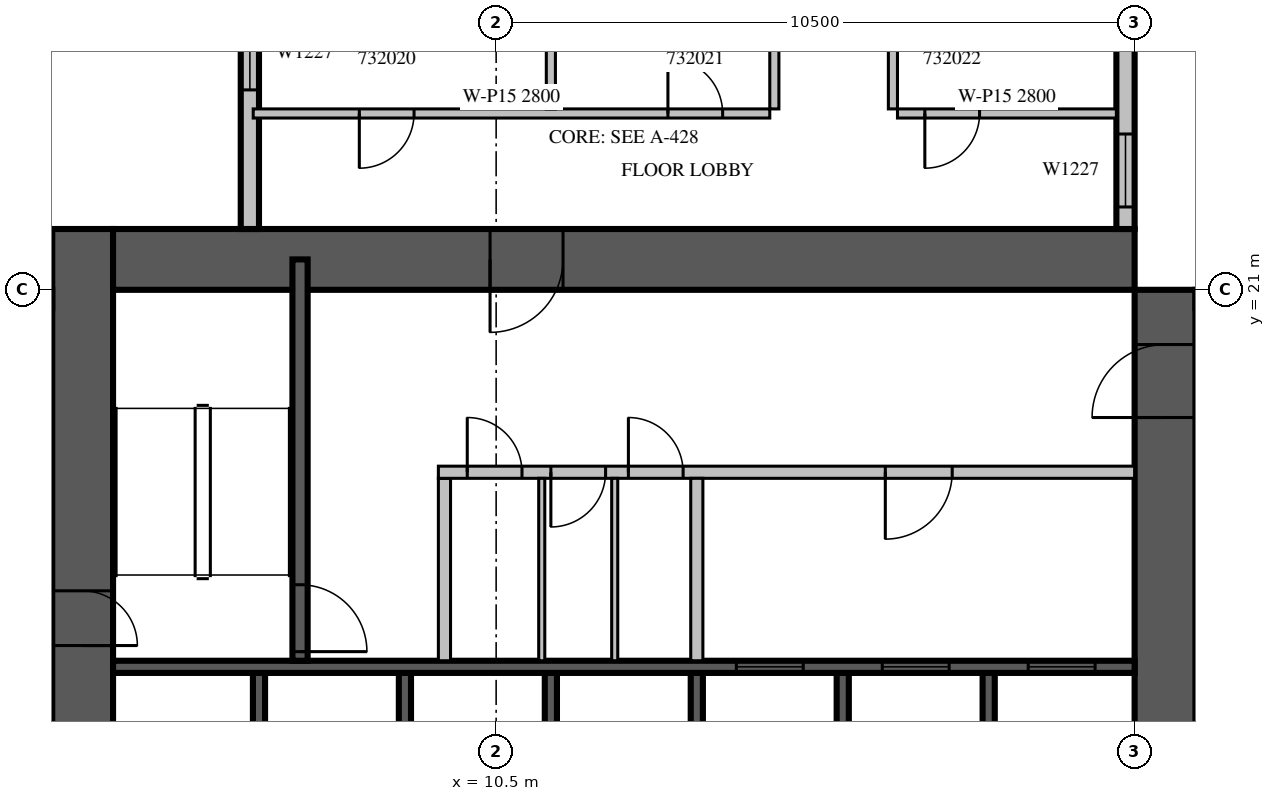
"""IFC4 building model, lengths in metres.
Left out: names, types, materials, properties, quantities, classifications, styles, units other than length and angle.
Written with IfcOpenShell. Run it as: python <this file> out.ifc"""

import sys

from ifc_helpers import new_model, si_unit, direction, frame, frame_2d, origin, place, context, subcontext, project, spatial, rectangle, extrude, source, transform, mapped, element, fill, save


model = new_model("IFC4")
c1 = context("Model", 3, precision=1e-05, world=origin(), true_north=direction((0.0, 1.0)))
c2 = subcontext(c1, "Body", "Model", "MODEL_VIEW")
j1 = project(units=[si_unit("LENGTHUNIT", "METRE"), si_unit("PLANEANGLEUNIT", "RADIAN")], contexts=[c1])
p1 = place(None, origin())
s1 = spatial("IfcSite", under=j1, at=p1, CompositionType="ELEMENT")
p2 = place(p1, origin())
s2 = spatial("IfcBuilding", under=s1, at=p2, CompositionType="ELEMENT")
p3 = place(p2, frame((0.0, 0.0, 145.5)))
s3 = spatial("IfcBuildingStorey", under=s2, at=p3, CompositionType="ELEMENT", Elevation=145.5)
m1 = source(origin(), c2, "Body", "SweptSolid", [
    extrude(rectangle(XDim=17.8, YDim=1.0, at=frame_2d((8.9, 0.0))), origin(), (0.0, 0.0, 1.0), 4.2),
])
p4 = place(p3, frame((3.7, 4.2, 0.0), z_axis=(0.0, 0.0, 1.0), x_axis=(0.0, 1.0, 0.0)))
e1 = element("IfcWall", 1, at=p4, inside=s3, PredefinedType="SHEAR", context=c2, shape_type="MappedRepresentation", body=[
    mapped(m1, transform((0.0, 0.0, 0.0), scale=1.0)),
])
m2 = source(origin(), c2, "Body", "SweptSolid", [
    extrude(rectangle(XDim=2.2, YDim=2.1, at=frame_2d((1.1, 1.05))), frame((0.0, 0.51, 0.0), z_axis=(0.0, -1.0, 0.0), x_axis=(1.0, 0.0, 0.0)), (0.0, 0.0, 1.0), 1.02),
])
p5 = place(p4, frame((4.2, 0.0, 0.0)))
e2 = element("IfcOpeningElement", 2, at=p5, cuts=e1, PredefinedType="OPENING", context=c2, shape_type="MappedRepresentation", body=[
    mapped(m2, transform((0.0, 0.0, 0.0), scale=1.0)),
])
m3 = source(origin(), c2, "Body", "SweptSolid", [
    extrude(rectangle(XDim=0.9, YDim=2.1, at=frame_2d((0.45, 1.05))), frame((0.0, 0.51, 0.0), z_axis=(0.0, -1.0, 0.0), x_axis=(1.0, 0.0, 0.0)), (0.0, 0.0, 1.0), 1.02),
])
p6 = place(p4, frame((10.95, 0.0, 0.0)))
e3 = element("IfcOpeningElement", 3, at=p6, cuts=e1, PredefinedType="OPENING", context=c2, shape_type="MappedRepresentation", body=[
    mapped(m3, transform((0.0, 0.0, 0.0), scale=1.0)),
])
m4 = source(origin(), c2, "Body", "SweptSolid", [
    extrude(rectangle(XDim=16.8, YDim=1.0, at=frame_2d((8.4, 0.0))), origin(), (0.0, 0.0, 1.0), 4.2),
])
p7 = place(p3, frame((21.5, 4.2, 0.0), z_axis=(0.0, 0.0, 1.0), x_axis=(0.0, 1.0, 0.0)))
e4 = element("IfcWall", 4, at=p7, inside=s3, PredefinedType="SHEAR", context=c2, shape_type="MappedRepresentation", body=[
    mapped(m4, transform((0.0, 0.0, 0.0), scale=1.0)),
])
p8 = place(p7, frame((4.2, 0.0, 0.0)))
e5 = element("IfcOpeningElement", 5, at=p8, cuts=e4, PredefinedType="OPENING", context=c2, shape_type="MappedRepresentation", body=[
    mapped(m2, transform((0.0, 0.0, 0.0), scale=1.0)),
])
m5 = source(origin(), c2, "Body", "SweptSolid", [
    extrude(rectangle(XDim=1.2, YDim=2.1, at=frame_2d((0.6, 1.05))), frame((0.0, 0.51, 0.0), z_axis=(0.0, -1.0, 0.0), x_axis=(1.0, 0.0, 0.0)), (0.0, 0.0, 1.0), 1.02),
])
p9 = place(p7, frame((14.7, 0.0, 0.0)))
e6 = element("IfcOpeningElement", 6, at=p9, cuts=e4, PredefinedType="OPENING", context=c2, shape_type="MappedRepresentation", body=[
    mapped(m5, transform((0.0, 0.0, 0.0), scale=1.0)),
])
p10 = place(p3, frame((4.2, 21.5, 0.0), z_axis=(0.0, 0.0, 1.0), x_axis=(1.0, 0.0, 0.0)))
e7 = element("IfcWall", 7, at=p10, inside=s3, PredefinedType="SHEAR", context=c2, shape_type="MappedRepresentation", body=[
    mapped(m4, transform((0.0, 0.0, 0.0), scale=1.0)),
])
p11 = place(p10, frame((6.2, 0.0, 0.0)))
e8 = element("IfcOpeningElement", 8, at=p11, cuts=e7, PredefinedType="OPENING", context=c2, shape_type="MappedRepresentation", body=[
    mapped(m5, transform((0.0, 0.0, 0.0), scale=1.0)),
])
m6 = source(origin(), c2, "Body", "SweptSolid", [
    extrude(rectangle(XDim=6.875, YDim=0.3, at=frame_2d((3.438, 0.0))), origin(), (0.0, 0.0, 1.0), 3.3),
])
p12 = place(p3, frame((20.85, 22.0, 0.0), z_axis=(0.0, 0.0, 1.0), x_axis=(0.0, 1.0, 0.0)))
e9 = element("IfcWall", 9, at=p12, inside=s3, PredefinedType="STANDARD", context=c2, shape_type="MappedRepresentation", body=[
    mapped(m6, transform((0.0, 0.0, 0.0), scale=1.0)),
])
m7 = source(origin(), c2, "Body", "SweptSolid", [
    extrude(rectangle(XDim=1.2, YDim=2.7, at=frame_2d((0.6, 1.35))), frame((0.0, 0.16, 0.0), z_axis=(0.0, -1.0, 0.0), x_axis=(1.0, 0.0, 0.0)), (0.0, 0.0, 1.0), 0.32),
])
p13 = place(p12, frame((0.362, 0.0, 0.6)))
e10 = element("IfcOpeningElement", 10, at=p13, cuts=e9, PredefinedType="OPENING", context=c2, shape_type="MappedRepresentation", body=[
    mapped(m7, transform((0.0, 0.0, 0.0), scale=1.0)),
])
m8 = source(origin(), c2, "Body", "SweptSolid", [
    extrude(rectangle(XDim=2.4, YDim=2.7, at=frame_2d((1.2, 1.35))), frame((0.0, 0.16, 0.0), z_axis=(0.0, -1.0, 0.0), x_axis=(1.0, 0.0, 0.0)), (0.0, 0.0, 1.0), 0.32),
])
p14 = place(p12, frame((4.1, 0.0, 0.6)))
e11 = element("IfcOpeningElement", 11, at=p14, cuts=e9, PredefinedType="OPENING", context=c2, shape_type="MappedRepresentation", body=[
    mapped(m8, transform((0.0, 0.0, 0.0), scale=1.0)),
])
m9 = source(origin(), c2, "Body", "SweptSolid", [
    extrude(rectangle(XDim=16.4, YDim=0.3, at=frame_2d((8.2, 0.0))), origin(), (0.0, 0.0, 1.0), 3.3),
])
p15 = place(p3, frame((6.45, 38.4, 0.0), z_axis=(0.0, 0.0, 1.0), x_axis=(0.0, -1.0, 0.0)))
e12 = element("IfcWall", 12, at=p15, inside=s3, PredefinedType="STANDARD", context=c2, shape_type="MappedRepresentation", body=[
    mapped(m9, transform((0.0, 0.0, 0.0), scale=1.0)),
])
m10 = source(origin(), c2, "Body", "SweptSolid", [
    extrude(rectangle(XDim=1.8, YDim=2.7, at=frame_2d((0.9, 1.35))), frame((0.0, 0.16, 0.0), z_axis=(0.0, -1.0, 0.0), x_axis=(1.0, 0.0, 0.0)), (0.0, 0.0, 1.0), 0.32),
])
p16 = place(p15, frame((1.15, 0.0, 0.6)))
e13 = element("IfcOpeningElement", 13, at=p16, cuts=e12, PredefinedType="OPENING", context=c2, shape_type="MappedRepresentation", body=[
    mapped(m10, transform((0.0, 0.0, 0.0), scale=1.0)),
])
p17 = place(p15, frame((5.162, 0.0, 0.6)))
e14 = element("IfcOpeningElement", 14, at=p17, cuts=e12, PredefinedType="OPENING", context=c2, shape_type="MappedRepresentation", body=[
    mapped(m10, transform((0.0, 0.0, 0.0), scale=1.0)),
])
p18 = place(p15, frame((9.438, 0.0, 0.6)))
e15 = element("IfcOpeningElement", 15, at=p18, cuts=e12, PredefinedType="OPENING", context=c2, shape_type="MappedRepresentation", body=[
    mapped(m10, transform((0.0, 0.0, 0.0), scale=1.0)),
])
p19 = place(p15, frame((12.912, 0.0, 0.6)))
e16 = element("IfcOpeningElement", 16, at=p19, cuts=e12, PredefinedType="OPENING", context=c2, shape_type="MappedRepresentation", body=[
    mapped(m7, transform((0.0, 0.0, 0.0), scale=1.0)),
])
m11 = source(origin(), c2, "Body", "SweptSolid", [
    extrude(rectangle(XDim=3.0, YDim=0.2, at=frame_2d((1.5, 0.0))), origin(), (0.0, 0.0, 1.0), 4.2),
])
for number, where, z_axis, x_axis in (
    (17, (6.6, 11.7, 0.0), (0.0, 0.0, 1.0), (0.0, 1.0, 0.0)),
    (18, (9.0, 11.7, 0.0), (0.0, 0.0, 1.0), (0.0, 1.0, 0.0)),
    (19, (11.4, 11.7, 0.0), (0.0, 0.0, 1.0), (0.0, 1.0, 0.0)),
    (20, (13.8, 11.7, 0.0), (0.0, 0.0, 1.0), (0.0, 1.0, 0.0)),
    (21, (16.2, 11.7, 0.0), (0.0, 0.0, 1.0), (0.0, 1.0, 0.0)),
    (22, (18.6, 11.7, 0.0), (0.0, 0.0, 1.0), (0.0, 1.0, 0.0)),
):
    element("IfcWall", number, at=place(p3, frame(where, z_axis=z_axis, x_axis=x_axis)), inside=s3, PredefinedType="SOLIDWALL", context=c2, shape_type="MappedRepresentation", body=[
        mapped(m11, transform((0.0, 0.0, 0.0), scale=1.0)),
    ])
m12 = source(origin(), c2, "Body", "SweptSolid", [
    extrude(rectangle(XDim=16.8, YDim=0.2, at=frame_2d((8.4, 0.0))), origin(), (0.0, 0.0, 1.0), 4.2),
])
p20 = place(p3, frame((4.2, 14.8, 0.0), z_axis=(0.0, 0.0, 1.0), x_axis=(1.0, 0.0, 0.0)))
e23 = element("IfcWall", 23, at=p20, inside=s3, PredefinedType="SOLIDWALL", context=c2, shape_type="MappedRepresentation", body=[
    mapped(m12, transform((0.0, 0.0, 0.0), scale=1.0)),
])
m13 = source(origin(), c2, "Body", "SweptSolid", [
    extrude(rectangle(XDim=1.1, YDim=2.1, at=frame_2d((0.55, 1.05))), frame((0.0, 0.11, 0.0), z_axis=(0.0, -1.0, 0.0), x_axis=(1.0, 0.0, 0.0)), (0.0, 0.0, 1.0), 0.22),
])
p21 = place(p20, frame((10.25, 0.0, 0.0)))
e24 = element("IfcOpeningElement", 24, at=p21, cuts=e23, PredefinedType="OPENING", context=c2, shape_type="MappedRepresentation", body=[
    mapped(m13, transform((0.0, 0.0, 0.0), scale=1.0)),
])
p22 = place(p20, frame((12.65, 0.0, 0.0)))
e25 = element("IfcOpeningElement", 25, at=p22, cuts=e23, PredefinedType="OPENING", context=c2, shape_type="MappedRepresentation", body=[
    mapped(m13, transform((0.0, 0.0, 0.0), scale=1.0)),
])
p23 = place(p20, frame((15.05, 0.0, 0.0)))
e26 = element("IfcOpeningElement", 26, at=p23, cuts=e23, PredefinedType="OPENING", context=c2, shape_type="MappedRepresentation", body=[
    mapped(m13, transform((0.0, 0.0, 0.0), scale=1.0)),
])
m14 = source(origin(), c2, "Body", "SweptSolid", [
    extrude(rectangle(XDim=6.6, YDim=0.25, at=frame_2d((3.3, 0.0))), origin(), (0.0, 0.0, 1.0), 3.8),
])
p24 = place(p3, frame((7.275, 14.9, 0.0), z_axis=(0.0, 0.0, 1.0), x_axis=(0.0, 1.0, 0.0)))
e27 = element("IfcWall", 27, at=p24, inside=s3, PredefinedType="SOLIDWALL", context=c2, shape_type="MappedRepresentation", body=[
    mapped(m14, transform((0.0, 0.0, 0.0), scale=1.0)),
])
m15 = source(origin(), c2, "Body", "SweptSolid", [
    extrude(rectangle(XDim=1.1, YDim=2.1, at=frame_2d((0.55, 1.05))), frame((0.0, 0.135, 0.0), z_axis=(0.0, -1.0, 0.0), x_axis=(1.0, 0.0, 0.0)), (0.0, 0.0, 1.0), 0.27),
])
p25 = place(p24, frame((0.15, 0.0, 0.0)))
e28 = element("IfcOpeningElement", 28, at=p25, cuts=e27, PredefinedType="OPENING", context=c2, shape_type="MappedRepresentation", body=[
    mapped(m15, transform((0.0, 0.0, 0.0), scale=1.0)),
])
m16 = source(origin(), c2, "Body", "SweptSolid", [
    extrude(rectangle(XDim=3.0, YDim=0.2, at=frame_2d((1.5, 0.0))), origin(), (0.0, 0.0, 1.0), 3.8),
])
p26 = place(p3, frame((9.65, 14.9, 0.0), z_axis=(0.0, 0.0, 1.0), x_axis=(0.0, 1.0, 0.0)))
e29 = element("IfcWall", 29, at=p26, inside=s3, PredefinedType="PARTITIONING", context=c2, shape_type="MappedRepresentation", body=[
    mapped(m16, transform((0.0, 0.0, 0.0), scale=1.0)),
])
m17 = source(origin(), c2, "Body", "SweptSolid", [
    extrude(rectangle(XDim=11.45, YDim=0.2, at=frame_2d((5.725, 0.0))), origin(), (0.0, 0.0, 1.0), 3.8),
])
p27 = place(p3, frame((9.55, 18.0, 0.0), z_axis=(0.0, 0.0, 1.0), x_axis=(1.0, 0.0, 0.0)))
e30 = element("IfcWall", 30, at=p27, inside=s3, PredefinedType="PARTITIONING", context=c2, shape_type="MappedRepresentation", body=[
    mapped(m17, transform((0.0, 0.0, 0.0), scale=1.0)),
])
m18 = source(origin(), c2, "Body", "SweptSolid", [
    extrude(rectangle(XDim=0.9, YDim=2.1, at=frame_2d((0.45, 1.05))), frame((0.0, 0.11, 0.0), z_axis=(0.0, -1.0, 0.0), x_axis=(1.0, 0.0, 0.0)), (0.0, 0.0, 1.0), 0.22),
])
p28 = place(p27, frame((0.475, 0.0, 0.0)))
e31 = element("IfcOpeningElement", 31, at=p28, cuts=e30, PredefinedType="OPENING", context=c2, shape_type="MappedRepresentation", body=[
    mapped(m18, transform((0.0, 0.0, 0.0), scale=1.0)),
])
p29 = place(p27, frame((1.85, 0.0, 0.0)))
e32 = element("IfcOpeningElement", 32, at=p29, cuts=e30, PredefinedType="OPENING", context=c2, shape_type="MappedRepresentation", body=[
    mapped(m18, transform((0.0, 0.0, 0.0), scale=1.0)),
])
p30 = place(p27, frame((3.125, 0.0, 0.0)))
e33 = element("IfcOpeningElement", 33, at=p30, cuts=e30, PredefinedType="OPENING", context=c2, shape_type="MappedRepresentation", body=[
    mapped(m18, transform((0.0, 0.0, 0.0), scale=1.0)),
])
p31 = place(p27, frame((7.35, 0.0, 0.0)))
e34 = element("IfcOpeningElement", 34, at=p31, cuts=e30, PredefinedType="OPENING", context=c2, shape_type="MappedRepresentation", body=[
    mapped(m13, transform((0.0, 0.0, 0.0), scale=1.0)),
])
p32 = place(p3, frame((13.8, 14.9, 0.0), z_axis=(0.0, 0.0, 1.0), x_axis=(0.0, 1.0, 0.0)))
e35 = element("IfcWall", 35, at=p32, inside=s3, PredefinedType="PARTITIONING", context=c2, shape_type="MappedRepresentation", body=[
    mapped(m16, transform((0.0, 0.0, 0.0), scale=1.0)),
])
m19 = source(origin(), c2, "Body", "SweptSolid", [
    extrude(rectangle(XDim=3.0, YDim=0.1, at=frame_2d((1.5, 0.0))), origin(), (0.0, 0.0, 1.0), 3.8),
])
for number, where, z_axis, x_axis in (
    (36, (11.25, 14.9, 0.0), (0.0, 0.0, 1.0), (0.0, 1.0, 0.0)),
    (37, (12.45, 14.9, 0.0), (0.0, 0.0, 1.0), (0.0, 1.0, 0.0)),
):
    element("IfcWall", number, at=place(p3, frame(where, z_axis=z_axis, x_axis=x_axis)), inside=s3, PredefinedType="PARTITIONING", context=c2, shape_type="MappedRepresentation", body=[
        mapped(m19, transform((0.0, 0.0, 0.0), scale=1.0)),
    ])
m20 = source(origin(), c2, "Body", "SweptSolid", [
    extrude(rectangle(XDim=8.495, YDim=0.15, at=frame_2d((4.247, 0.0))), origin(), (0.0, 0.0, 1.0), 2.8),
])
p33 = place(p3, frame((6.505, 23.9, 0.0), z_axis=(0.0, 0.0, 1.0), x_axis=(1.0, 0.0, 0.0)))
e38 = element("IfcWall", 38, at=p33, inside=s3, PredefinedType="PARTITIONING", context=c2, shape_type="MappedRepresentation", body=[
    mapped(m20, transform((0.0, 0.0, 0.0), scale=1.0)),
])
m21 = source(origin(), c2, "Body", "SweptSolid", [
    extrude(rectangle(XDim=0.9, YDim=2.1, at=frame_2d((0.45, 1.05))), frame((0.0, 0.085, 0.0), z_axis=(0.0, -1.0, 0.0), x_axis=(1.0, 0.0, 0.0)), (0.0, 0.0, 1.0), 0.17),
])
p34 = place(p33, frame((1.745, 0.0, 0.0)))
e39 = element("IfcOpeningElement", 39, at=p34, cuts=e38, PredefinedType="OPENING", context=c2, shape_type="MappedRepresentation", body=[
    mapped(m21, transform((0.0, 0.0, 0.0), scale=1.0)),
])
p35 = place(p33, frame((6.82, 0.0, 0.0)))
e40 = element("IfcOpeningElement", 40, at=p35, cuts=e38, PredefinedType="OPENING", context=c2, shape_type="MappedRepresentation", body=[
    mapped(m21, transform((0.0, 0.0, 0.0), scale=1.0)),
])
m22 = source(origin(), c2, "Body", "SweptSolid", [
    extrude(rectangle(XDim=3.6, YDim=0.15, at=frame_2d((1.8, 0.0))), origin(), (0.0, 0.0, 1.0), 2.8),
])
p36 = place(p3, frame((17.1, 23.9, 0.0), z_axis=(0.0, 0.0, 1.0), x_axis=(1.0, 0.0, 0.0)))
e41 = element("IfcWall", 41, at=p36, inside=s3, PredefinedType="PARTITIONING", context=c2, shape_type="MappedRepresentation", body=[
    mapped(m22, transform((0.0, 0.0, 0.0), scale=1.0)),
])
p37 = place(p36, frame((0.45, 0.0, 0.0)))
e42 = element("IfcOpeningElement", 42, at=p37, cuts=e41, PredefinedType="OPENING", context=c2, shape_type="MappedRepresentation", body=[
    mapped(m21, transform((0.0, 0.0, 0.0), scale=1.0)),
])
p38 = place(p3, frame((11.4, 23.975, 0.0), z_axis=(0.0, 0.0, 1.0), x_axis=(0.0, 1.0, 0.0)))
e43 = element("IfcWall", 43, at=p38, inside=s3, PredefinedType="PARTITIONING", context=c2, shape_type="SweptSolid", body=[
    extrude(rectangle(XDim=5.35, YDim=0.15, at=frame_2d((2.675, 0.0))), origin(), (0.0, 0.0, 1.0), 3.3),
])
m23 = source(origin(), c2, "Body", "SweptSolid", [
    extrude(rectangle(XDim=5.35, YDim=0.15, at=frame_2d((2.675, 0.0))), origin(), (0.0, 0.0, 1.0), 3.3),
])
for number, where, z_axis, x_axis in (
    (44, (15.075, 23.975, 0.0), (0.0, 0.0, 1.0), (0.0, 1.0, 0.0)),
    (45, (17.025, 29.325, 0.0), (0.0, 0.0, 1.0), (0.0, -1.0, 0.0)),
):
    element("IfcWall", number, at=place(p3, frame(where, z_axis=z_axis, x_axis=x_axis)), inside=s3, PredefinedType="PARTITIONING", context=c2, shape_type="MappedRepresentation", body=[
        mapped(m23, transform((0.0, 0.0, 0.0), scale=1.0)),
    ])
m24 = source(origin(), c2, "Body", "SweptSolid", [
    extrude(rectangle(XDim=1.2, YDim=2.7, at=frame_2d((0.6, 1.35))), frame((0.0, 0.03, 0.0), z_axis=(0.0, -1.0, 0.0), x_axis=(1.0, 0.0, 0.0)), (0.0, 0.0, 1.0), 0.06),
])
p39 = place(p13, origin())
e46 = element("IfcWindow", 46, at=p39, inside=s3, PartitioningType="SINGLE_PANEL", PredefinedType="WINDOW", context=c2, shape_type="MappedRepresentation", body=[
    mapped(m24, transform((0.0, 0.0, 0.0), scale=1.0)),
])
fill(e10, e46)
p40 = place(p19, origin())
e47 = element("IfcWindow", 47, at=p40, inside=s3, PartitioningType="SINGLE_PANEL", PredefinedType="WINDOW", context=c2, shape_type="MappedRepresentation", body=[
    mapped(m24, transform((0.0, 0.0, 0.0), scale=1.0)),
])
fill(e16, e47)
m25 = source(origin(), c2, "Body", "SweptSolid", [
    extrude(rectangle(XDim=1.1, YDim=2.1, at=frame_2d((0.55, 1.05))), frame((0.0, 0.025, 0.0), z_axis=(0.0, -1.0, 0.0), x_axis=(1.0, 0.0, 0.0)), (0.0, 0.0, 1.0), 0.05),
])
p41 = place(p21, origin())
e48 = element("IfcDoor", 48, at=p41, inside=s3, OperationType="SLIDING_TO_LEFT", PredefinedType="DOOR", context=c2, shape_type="MappedRepresentation", body=[
    mapped(m25, transform((0.0, 0.0, 0.0), scale=1.0)),
])
fill(e24, e48)
p42 = place(p22, origin())
e49 = element("IfcDoor", 49, at=p42, inside=s3, OperationType="SLIDING_TO_LEFT", PredefinedType="DOOR", context=c2, shape_type="MappedRepresentation", body=[
    mapped(m25, transform((0.0, 0.0, 0.0), scale=1.0)),
])
fill(e25, e49)
p43 = place(p23, origin())
e50 = element("IfcDoor", 50, at=p43, inside=s3, OperationType="SLIDING_TO_LEFT", PredefinedType="DOOR", context=c2, shape_type="MappedRepresentation", body=[
    mapped(m25, transform((0.0, 0.0, 0.0), scale=1.0)),
])
fill(e26, e50)
p44 = place(p25, origin())
e51 = element("IfcDoor", 51, at=p44, inside=s3, OperationType="SINGLE_SWING_RIGHT", PredefinedType="DOOR", context=c2, shape_type="MappedRepresentation", body=[
    mapped(m25, transform((0.0, 0.0, 0.0), scale=1.0)),
])
fill(e28, e51)
m26 = source(origin(), c2, "Body", "SweptSolid", [
    extrude(rectangle(XDim=0.9, YDim=2.1, at=frame_2d((0.45, 1.05))), frame((0.0, 0.025, 0.0), z_axis=(0.0, -1.0, 0.0), x_axis=(1.0, 0.0, 0.0)), (0.0, 0.0, 1.0), 0.05),
])
p45 = place(p28, origin())
e52 = element("IfcDoor", 52, at=p45, inside=s3, OperationType="SINGLE_SWING_LEFT", PredefinedType="DOOR", context=c2, shape_type="MappedRepresentation", body=[
    mapped(m26, transform((0.0, 0.0, 0.0), scale=1.0)),
])
fill(e31, e52)
p46 = place(p29, origin())
e53 = element("IfcDoor", 53, at=p46, inside=s3, OperationType="SINGLE_SWING_RIGHT", PredefinedType="DOOR", context=c2, shape_type="MappedRepresentation", body=[
    mapped(m26, transform((0.0, 0.0, 0.0), scale=1.0)),
])
fill(e32, e53)
p47 = place(p30, origin())
e54 = element("IfcDoor", 54, at=p47, inside=s3, OperationType="SINGLE_SWING_LEFT", PredefinedType="DOOR", context=c2, shape_type="MappedRepresentation", body=[
    mapped(m26, transform((0.0, 0.0, 0.0), scale=1.0)),
])
fill(e33, e54)
p48 = place(p31, origin())
e55 = element("IfcDoor", 55, at=p48, inside=s3, OperationType="SINGLE_SWING_RIGHT", PredefinedType="DOOR", context=c2, shape_type="MappedRepresentation", body=[
    mapped(m25, transform((0.0, 0.0, 0.0), scale=1.0)),
])
fill(e34, e55)
m27 = source(origin(), c2, "Body", "SweptSolid", [
    extrude(rectangle(XDim=1.2, YDim=2.1, at=frame_2d((0.6, 1.05))), frame((0.0, 0.025, 0.0), z_axis=(0.0, -1.0, 0.0), x_axis=(1.0, 0.0, 0.0)), (0.0, 0.0, 1.0), 0.05),
])
p49 = place(p11, origin())
e56 = element("IfcDoor", 56, at=p49, inside=s3, OperationType="SINGLE_SWING_RIGHT", PredefinedType="DOOR", context=c2, shape_type="MappedRepresentation", body=[
    mapped(m27, transform((0.0, 0.0, 0.0), scale=1.0)),
])
fill(e8, e56)
p50 = place(p9, origin())
e57 = element("IfcDoor", 57, at=p50, inside=s3, OperationType="SINGLE_SWING_LEFT", PredefinedType="DOOR", context=c2, shape_type="MappedRepresentation", body=[
    mapped(m27, transform((0.0, 0.0, 0.0), scale=1.0)),
])
fill(e6, e57)
p51 = place(p6, origin())
e58 = element("IfcDoor", 58, at=p51, inside=s3, OperationType="SINGLE_SWING_RIGHT", PredefinedType="DOOR", context=c2, shape_type="MappedRepresentation", body=[
    mapped(m26, transform((0.0, 0.0, 0.0), scale=1.0)),
])
fill(e3, e58)
p52 = place(p34, origin())
e59 = element("IfcDoor", 59, at=p52, inside=s3, OperationType="SINGLE_SWING_RIGHT", PredefinedType="DOOR", context=c2, shape_type="MappedRepresentation", body=[
    mapped(m26, transform((0.0, 0.0, 0.0), scale=1.0)),
])
fill(e39, e59)
p53 = place(p35, origin())
e60 = element("IfcDoor", 60, at=p53, inside=s3, OperationType="SINGLE_SWING_LEFT", PredefinedType="DOOR", context=c2, shape_type="MappedRepresentation", body=[
    mapped(m26, transform((0.0, 0.0, 0.0), scale=1.0)),
])
fill(e40, e60)
p54 = place(p37, origin())
e61 = element("IfcDoor", 61, at=p54, inside=s3, OperationType="SINGLE_SWING_RIGHT", PredefinedType="DOOR", context=c2, shape_type="MappedRepresentation", body=[
    mapped(m26, transform((0.0, 0.0, 0.0), scale=1.0)),
])
fill(e42, e61)
save(model, sys.argv[1])
